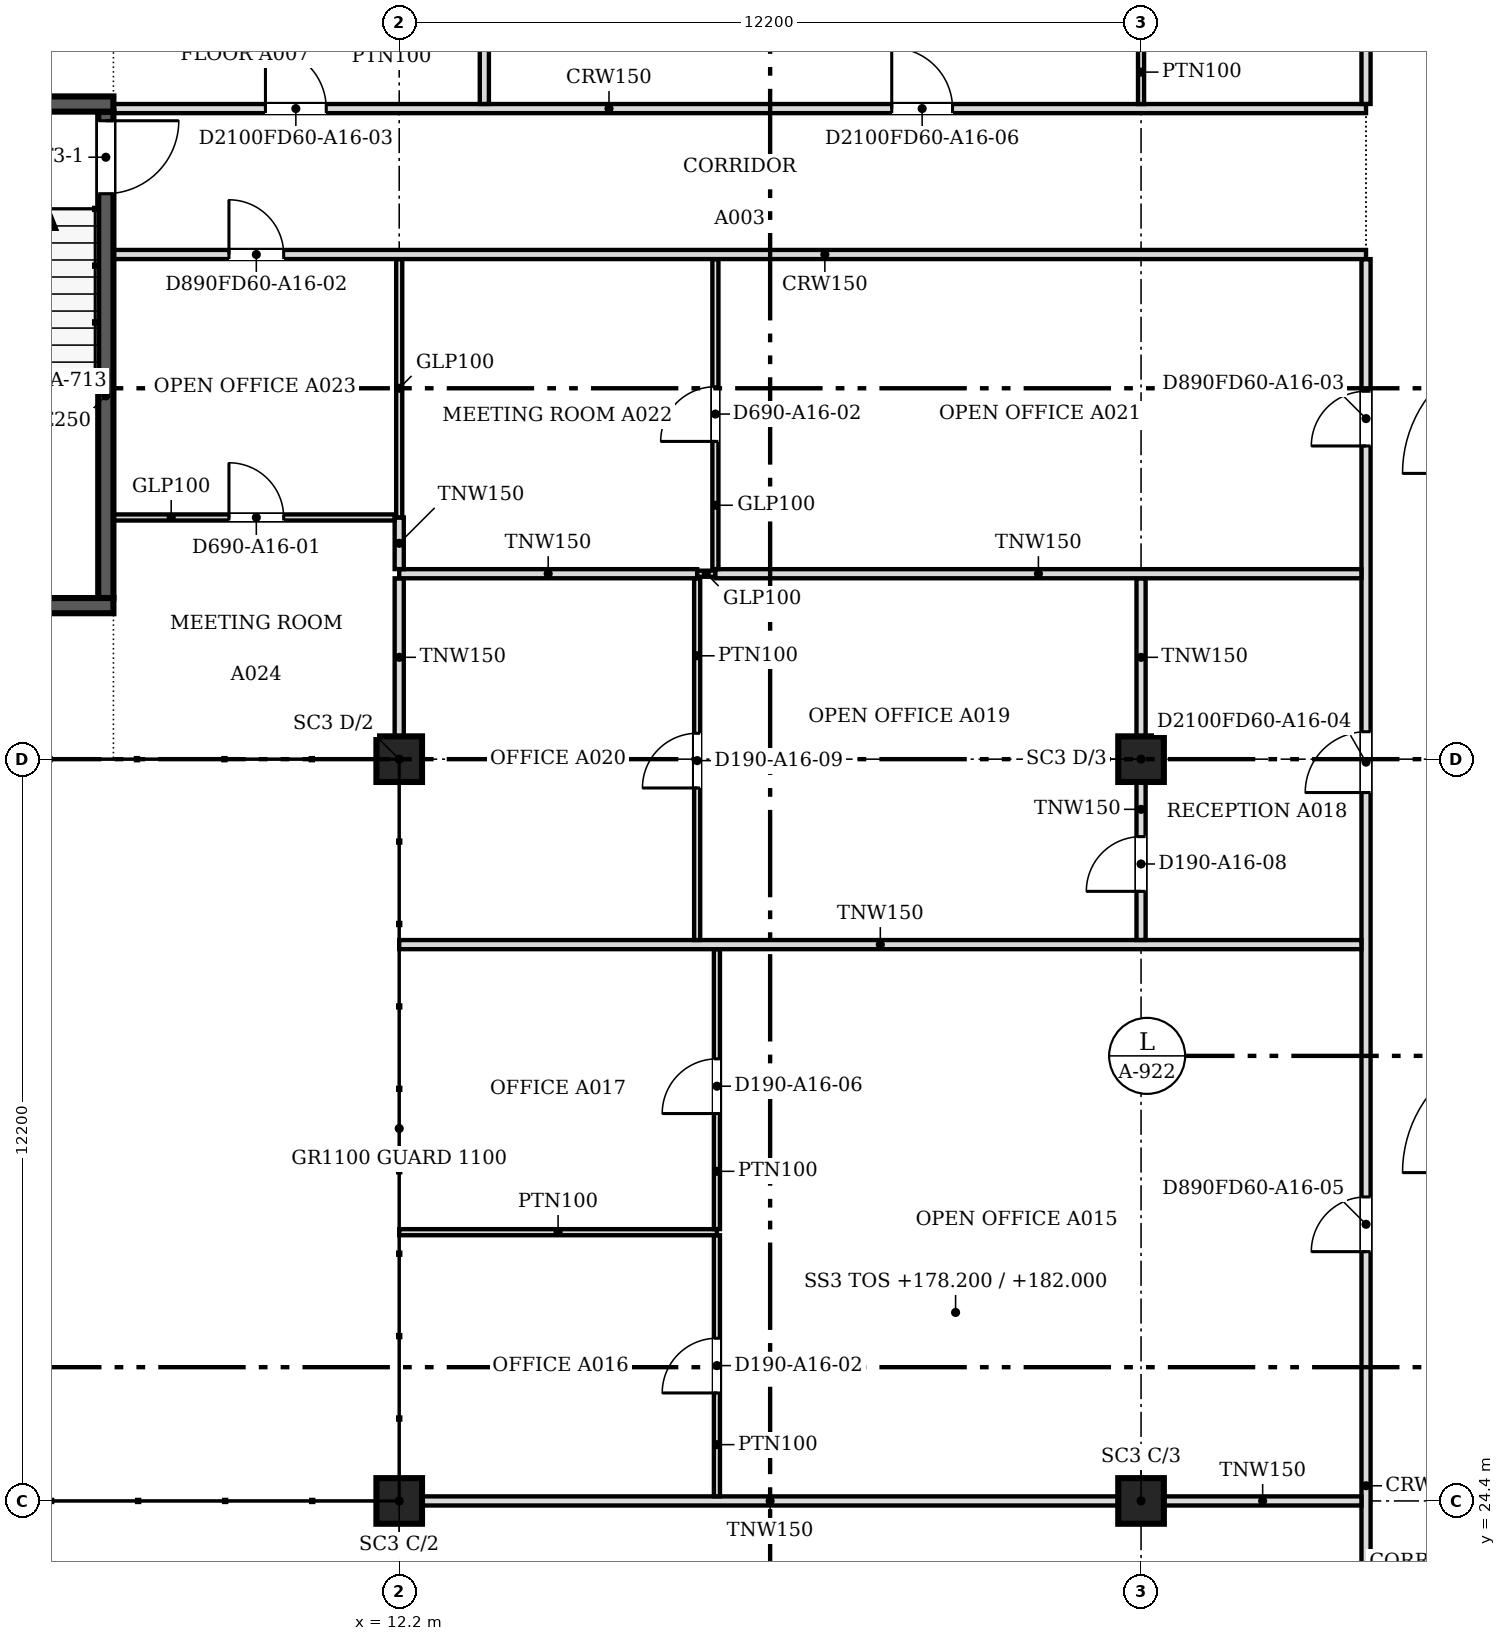
"""IFC4 building model, lengths in metres.
Left out: names, types, materials, properties, quantities, classifications, styles, units other than length and angle.
Written with IfcOpenShell. Run it as: python <this file> out.ifc"""

import sys

from ifc_helpers import new_model, si_unit, direction, frame, frame_2d, origin, origin_2d, place, context, subcontext, project, spatial, rectangle, extrude, source, transform, mapped, element, fill, save


model = new_model("IFC4")
c1 = context("Model", 3, precision=1e-05, world=origin(), true_north=direction((0.0, 1.0)))
c2 = subcontext(c1, "Body", "Model", "MODEL_VIEW")
j1 = project(units=[si_unit("LENGTHUNIT", "METRE"), si_unit("PLANEANGLEUNIT", "RADIAN")], contexts=[c1])
p1 = place(None, origin())
s1 = spatial("IfcSite", under=j1, at=p1, CompositionType="ELEMENT")
p2 = place(p1, origin())
s2 = spatial("IfcBuilding", under=s1, at=p2, CompositionType="ELEMENT")
p3 = place(p2, frame((0.0, 0.0, 178.2)))
s3 = spatial("IfcBuildingStorey", under=s2, at=p3, CompositionType="ELEMENT", Elevation=178.2)
for number, where, z_axis, x_axis in (
    (1, (12.2, 24.4, 0.0), (0.0, 0.0, 1.0), (1.0, 0.0, 0.0)),
    (2, (12.2, 36.6, 0.0), (0.0, 0.0, 1.0), (1.0, 0.0, 0.0)),
    (3, (24.4, 24.4, 0.0), (0.0, 0.0, 1.0), (1.0, 0.0, 0.0)),
    (4, (24.4, 36.6, 0.0), (0.0, 0.0, 1.0), (1.0, 0.0, 0.0)),
):
    element("IfcColumn", number, at=place(p3, frame(where, z_axis=z_axis, x_axis=x_axis)), inside=s3, PredefinedType="COLUMN", context=c2, shape_type="SweptSolid", body=[
        extrude(rectangle(XDim=0.75, YDim=0.75, at=origin_2d()), origin(), (0.0, 0.0, 1.0), 3.6),
    ])
for number, where, z_axis, x_axis in (
    (5, (7.5, 39.125, 0.0), (0.0, 0.0, 1.0), (-1.0, 0.0, 0.0)),
    (6, (3.6, 47.375, 0.0), (0.0, 0.0, 1.0), (1.0, 0.0, 0.0)),
):
    element("IfcWall", number, at=place(p3, frame(where, z_axis=z_axis, x_axis=x_axis)), inside=s3, PredefinedType="SOLIDWALL", context=c2, shape_type="SweptSolid", body=[
        extrude(rectangle(XDim=3.9, YDim=0.25, at=frame_2d((1.95, 0.0))), origin(), (0.0, 0.0, 1.0), 3.8),
    ])
p4 = place(p3, frame((7.375, 47.25, 0.0), z_axis=(0.0, 0.0, 1.0), x_axis=(0.0, -1.0, 0.0)))
e7 = element("IfcWall", 7, at=p4, inside=s3, PredefinedType="SOLIDWALL", context=c2, shape_type="SweptSolid", body=[
    extrude(rectangle(XDim=8.0, YDim=0.25, at=frame_2d((4.0, 0.0))), origin(), (0.0, 0.0, 1.0), 3.8),
])
m1 = source(origin(), c2, "Body", "SweptSolid", [
    extrude(rectangle(XDim=1.2, YDim=2.1, at=frame_2d((0.6, 1.05))), frame((0.0, 0.135, 0.0), z_axis=(0.0, -1.0, 0.0), x_axis=(1.0, 0.0, 0.0)), (0.0, 0.0, 1.0), 0.27),
])
p5 = place(p4, frame((0.15, 0.0, 0.0)))
e8 = element("IfcOpeningElement", 8, at=p5, cuts=e7, PredefinedType="OPENING", context=c2, shape_type="MappedRepresentation", body=[
    mapped(m1, transform((0.0, 0.0, 0.0), scale=1.0)),
])
p6 = place(p3, frame((28.1, 18.8, 0.0), z_axis=(0.0, 0.0, 1.0), x_axis=(0.0, 1.0, 0.0)))
e9 = element("IfcWall", 9, at=p6, inside=s3, PredefinedType="PARTITIONING", context=c2, shape_type="SweptSolid", body=[
    extrude(rectangle(XDim=26.024, YDim=0.15, at=frame_2d((13.012, 0.0))), origin(), (0.0, 0.0, 1.0), 3.067),
])
m2 = source(origin(), c2, "Body", "SweptSolid", [
    extrude(rectangle(XDim=0.9, YDim=2.1, at=frame_2d((0.45, 1.05))), frame((0.0, 0.085, 0.0), z_axis=(0.0, -1.0, 0.0), x_axis=(1.0, 0.0, 0.0)), (0.0, 0.0, 1.0), 0.17),
])
p7 = place(p6, frame((1.1, 0.0, 0.0)))
e10 = element("IfcOpeningElement", 10, at=p7, cuts=e9, PredefinedType="OPENING", context=c2, shape_type="MappedRepresentation", body=[
    mapped(m2, transform((0.0, 0.0, 0.0), scale=1.0)),
])
p8 = place(p6, frame((22.951, 0.0, 0.0)))
e11 = element("IfcOpeningElement", 11, at=p8, cuts=e9, PredefinedType="OPENING", context=c2, shape_type="MappedRepresentation", body=[
    mapped(m2, transform((0.0, 0.0, 0.0), scale=1.0)),
])
m3 = source(origin(), c2, "Body", "SweptSolid", [
    extrude(rectangle(XDim=1.0, YDim=2.1, at=frame_2d((0.5, 1.05))), frame((0.0, 0.085, 0.0), z_axis=(0.0, -1.0, 0.0), x_axis=(1.0, 0.0, 0.0)), (0.0, 0.0, 1.0), 0.17),
])
p9 = place(p6, frame((17.251, 0.0, 0.0)))
e12 = element("IfcOpeningElement", 12, at=p9, cuts=e9, PredefinedType="OPENING", context=c2, shape_type="MappedRepresentation", body=[
    mapped(m3, transform((0.0, 0.0, 0.0), scale=1.0)),
])
p10 = place(p6, frame((9.7, 0.0, 0.0)))
e13 = element("IfcOpeningElement", 13, at=p10, cuts=e9, PredefinedType="OPENING", context=c2, shape_type="MappedRepresentation", body=[
    mapped(m2, transform((0.0, 0.0, 0.0), scale=1.0)),
])
p11 = place(p3, frame((12.576, 24.4, 0.0), z_axis=(0.0, 0.0, 1.0), x_axis=(1.0, 0.0, 0.0)))
e14 = element("IfcWall", 14, at=p11, inside=s3, PredefinedType="PARTITIONING", context=c2, shape_type="SweptSolid", body=[
    extrude(rectangle(XDim=11.448, YDim=0.15, at=frame_2d((5.724, 0.0))), origin(), (0.0, 0.0, 1.0), 3.067),
])
p12 = place(p3, frame((24.776, 24.4, 0.0), z_axis=(0.0, 0.0, 1.0), x_axis=(1.0, 0.0, 0.0)))
e15 = element("IfcWall", 15, at=p12, inside=s3, PredefinedType="PARTITIONING", context=c2, shape_type="SweptSolid", body=[
    extrude(rectangle(XDim=3.248, YDim=0.15, at=frame_2d((1.624, 0.0))), origin(), (0.0, 0.0, 1.0), 3.067),
])
p13 = place(p3, frame((17.425, 24.476, 0.0), z_axis=(0.0, 0.0, 1.0), x_axis=(0.0, 1.0, 0.0)))
e16 = element("IfcWall", 16, at=p13, inside=s3, PredefinedType="PARTITIONING", context=c2, shape_type="SweptSolid", body=[
    extrude(rectangle(XDim=4.293, YDim=0.1, at=frame_2d((2.146, 0.0))), origin(), (0.0, 0.0, 1.0), 3.067),
])
m4 = source(origin(), c2, "Body", "SweptSolid", [
    extrude(rectangle(XDim=0.9, YDim=2.1, at=frame_2d((0.45, 1.05))), frame((0.0, 0.06, 0.0), z_axis=(0.0, -1.0, 0.0), x_axis=(1.0, 0.0, 0.0)), (0.0, 0.0, 1.0), 0.12),
])
p14 = place(p13, frame((1.7, 0.0, 0.0)))
e17 = element("IfcOpeningElement", 17, at=p14, cuts=e16, PredefinedType="OPENING", context=c2, shape_type="MappedRepresentation", body=[
    mapped(m4, transform((0.0, 0.0, 0.0), scale=1.0)),
])
p15 = place(p3, frame((12.2, 28.82, 0.0), z_axis=(0.0, 0.0, 1.0), x_axis=(1.0, 0.0, 0.0)))
e18 = element("IfcWall", 18, at=p15, inside=s3, PredefinedType="PARTITIONING", context=c2, shape_type="SweptSolid", body=[
    extrude(rectangle(XDim=5.225, YDim=0.1, at=frame_2d((2.613, 0.0))), origin(), (0.0, 0.0, 1.0), 3.067),
])
p16 = place(p3, frame((17.425, 28.871, 0.0), z_axis=(0.0, 0.0, 1.0), x_axis=(0.0, 1.0, 0.0)))
e19 = element("IfcWall", 19, at=p16, inside=s3, PredefinedType="PARTITIONING", context=c2, shape_type="SweptSolid", body=[
    extrude(rectangle(XDim=4.603, YDim=0.1, at=frame_2d((2.301, 0.0))), origin(), (0.0, 0.0, 1.0), 3.067),
])
p17 = place(p16, frame((1.9, 0.0, 0.0)))
e20 = element("IfcOpeningElement", 20, at=p17, cuts=e19, PredefinedType="OPENING", context=c2, shape_type="MappedRepresentation", body=[
    mapped(m4, transform((0.0, 0.0, 0.0), scale=1.0)),
])
p18 = place(p3, frame((12.2, 33.55, 0.0), z_axis=(0.0, 0.0, 1.0), x_axis=(1.0, 0.0, 0.0)))
e21 = element("IfcWall", 21, at=p18, inside=s3, PredefinedType="PARTITIONING", context=c2, shape_type="SweptSolid", body=[
    extrude(rectangle(XDim=15.824, YDim=0.15, at=frame_2d((7.912, 0.0))), origin(), (0.0, 0.0, 1.0), 3.067),
])
p19 = place(p3, frame((17.1, 33.626, 0.0), z_axis=(0.0, 0.0, 1.0), x_axis=(0.0, 1.0, 0.0)))
e22 = element("IfcWall", 22, at=p19, inside=s3, PredefinedType="PARTITIONING", context=c2, shape_type="SweptSolid", body=[
    extrude(rectangle(XDim=5.948, YDim=0.1, at=frame_2d((2.974, 0.0))), origin(), (0.0, 0.0, 1.0), 3.067),
])
p20 = place(p19, frame((2.5, 0.0, 0.0)))
e23 = element("IfcOpeningElement", 23, at=p20, cuts=e22, PredefinedType="OPENING", context=c2, shape_type="MappedRepresentation", body=[
    mapped(m4, transform((0.0, 0.0, 0.0), scale=1.0)),
])
p21 = place(p3, frame((24.4, 33.626, 0.0), z_axis=(0.0, 0.0, 1.0), x_axis=(0.0, 1.0, 0.0)))
e24 = element("IfcWall", 24, at=p21, inside=s3, PredefinedType="PARTITIONING", context=c2, shape_type="SweptSolid", body=[
    extrude(rectangle(XDim=2.598, YDim=0.15, at=frame_2d((1.299, 0.0))), origin(), (0.0, 0.0, 1.0), 3.067),
])
p22 = place(p21, frame((0.8, 0.0, 0.0)))
e25 = element("IfcOpeningElement", 25, at=p22, cuts=e24, PredefinedType="OPENING", context=c2, shape_type="MappedRepresentation", body=[
    mapped(m2, transform((0.0, 0.0, 0.0), scale=1.0)),
])
for number, where, z_axis, x_axis in (
    (26, (12.2, 36.976, 0.0), (0.0, 0.0, 1.0), (0.0, 1.0, 0.0)),
    (27, (24.4, 36.976, 0.0), (0.0, 0.0, 1.0), (0.0, 1.0, 0.0)),
):
    element("IfcWall", number, at=place(p3, frame(where, z_axis=z_axis, x_axis=x_axis)), inside=s3, PredefinedType="PARTITIONING", context=c2, shape_type="SweptSolid", body=[
        extrude(rectangle(XDim=2.598, YDim=0.15, at=frame_2d((1.299, 0.0))), origin(), (0.0, 0.0, 1.0), 3.067),
    ])
p23 = place(p3, frame((12.2, 39.65, 0.0), z_axis=(0.0, 0.0, 1.0), x_axis=(1.0, 0.0, 0.0)))
e28 = element("IfcWall", 28, at=p23, inside=s3, PredefinedType="PARTITIONING", context=c2, shape_type="SweptSolid", body=[
    extrude(rectangle(XDim=4.9, YDim=0.15, at=frame_2d((2.45, 0.0))), origin(), (0.0, 0.0, 1.0), 3.067),
])
p24 = place(p3, frame((17.101, 39.65, 0.0), z_axis=(0.0, 0.0, 1.0), x_axis=(1.0, 0.0, 0.0)))
e29 = element("IfcWall", 29, at=p24, inside=s3, PredefinedType="PARTITIONING", context=c2, shape_type="SweptSolid", body=[
    extrude(rectangle(XDim=0.298, YDim=0.1, at=frame_2d((0.149, 0.0))), origin(), (0.0, 0.0, 1.0), 3.067),
])
p25 = place(p3, frame((17.4, 39.65, 0.0), z_axis=(0.0, 0.0, 1.0), x_axis=(1.0, 0.0, 0.0)))
e30 = element("IfcWall", 30, at=p25, inside=s3, PredefinedType="PARTITIONING", context=c2, shape_type="SweptSolid", body=[
    extrude(rectangle(XDim=10.624, YDim=0.15, at=frame_2d((5.312, 0.0))), origin(), (0.0, 0.0, 1.0), 3.067),
])
p26 = place(p3, frame((12.2, 39.726, 0.0), z_axis=(0.0, 0.0, 1.0), x_axis=(0.0, 1.0, 0.0)))
e31 = element("IfcWall", 31, at=p26, inside=s3, PredefinedType="PARTITIONING", context=c2, shape_type="SweptSolid", body=[
    extrude(rectangle(XDim=0.849, YDim=0.15, at=frame_2d((0.424, 0.0))), origin(), (0.0, 0.0, 1.0), 3.067),
])
p27 = place(p3, frame((17.4, 39.726, 0.0), z_axis=(0.0, 0.0, 1.0), x_axis=(0.0, 1.0, 0.0)))
e32 = element("IfcWall", 32, at=p27, inside=s3, PredefinedType="PARTITIONING", context=c2, shape_type="SweptSolid", body=[
    extrude(rectangle(XDim=5.098, YDim=0.1, at=frame_2d((2.549, 0.0))), origin(), (0.0, 0.0, 1.0), 3.067),
])
p28 = place(p27, frame((2.1, 0.0, 0.0)))
e33 = element("IfcOpeningElement", 33, at=p28, cuts=e32, PredefinedType="OPENING", context=c2, shape_type="MappedRepresentation", body=[
    mapped(m4, transform((0.0, 0.0, 0.0), scale=1.0)),
])
p29 = place(p3, frame((12.124, 40.575, 0.0), z_axis=(0.0, 0.0, 1.0), x_axis=(-1.0, 0.0, 0.0)))
e34 = element("IfcWall", 34, at=p29, inside=s3, PredefinedType="PARTITIONING", context=c2, shape_type="SweptSolid", body=[
    extrude(rectangle(XDim=4.624, YDim=0.1, at=frame_2d((2.312, 0.0))), origin(), (0.0, 0.0, 1.0), 3.067),
])
p30 = place(p29, frame((1.824, 0.0, 0.0)))
e35 = element("IfcOpeningElement", 35, at=p30, cuts=e34, PredefinedType="OPENING", context=c2, shape_type="MappedRepresentation", body=[
    mapped(m4, transform((0.0, 0.0, 0.0), scale=1.0)),
])
p31 = place(p3, frame((12.2, 40.576, 0.0), z_axis=(0.0, 0.0, 1.0), x_axis=(0.0, 1.0, 0.0)))
e36 = element("IfcWall", 36, at=p31, inside=s3, PredefinedType="PARTITIONING", context=c2, shape_type="SweptSolid", body=[
    extrude(rectangle(XDim=4.248, YDim=0.1, at=frame_2d((2.124, 0.0))), origin(), (0.0, 0.0, 1.0), 3.067),
])
p32 = place(p3, frame((28.1, 44.9, 0.0), z_axis=(0.0, 0.0, 1.0), x_axis=(-1.0, 0.0, 0.0)))
e37 = element("IfcWall", 37, at=p32, inside=s3, PredefinedType="PARTITIONING", context=c2, shape_type="SweptSolid", body=[
    extrude(rectangle(XDim=20.6, YDim=0.15, at=frame_2d((10.3, 0.0))), origin(), (0.0, 0.0, 1.0), 3.067),
])
p33 = place(p32, frame((17.8, 0.0, 0.0)))
e38 = element("IfcOpeningElement", 38, at=p33, cuts=e37, PredefinedType="OPENING", context=c2, shape_type="MappedRepresentation", body=[
    mapped(m2, transform((0.0, 0.0, 0.0), scale=1.0)),
])
p34 = place(p3, frame((7.5, 47.3, 0.0), z_axis=(0.0, 0.0, 1.0), x_axis=(1.0, 0.0, 0.0)))
e39 = element("IfcWall", 39, at=p34, inside=s3, PredefinedType="PARTITIONING", context=c2, shape_type="SweptSolid", body=[
    extrude(rectangle(XDim=20.6, YDim=0.15, at=frame_2d((10.3, 0.0))), origin(), (0.0, 0.0, 1.0), 3.067),
])
p35 = place(p34, frame((2.5, 0.0, 0.0)))
e40 = element("IfcOpeningElement", 40, at=p35, cuts=e39, PredefinedType="OPENING", context=c2, shape_type="MappedRepresentation", body=[
    mapped(m3, transform((0.0, 0.0, 0.0), scale=1.0)),
])
p36 = place(p34, frame((12.8, 0.0, 0.0)))
e41 = element("IfcOpeningElement", 41, at=p36, cuts=e39, PredefinedType="OPENING", context=c2, shape_type="MappedRepresentation", body=[
    mapped(m3, transform((0.0, 0.0, 0.0), scale=1.0)),
])
p37 = place(p3, frame((13.6, 47.376, 0.0), z_axis=(0.0, 0.0, 1.0), x_axis=(0.0, 1.0, 0.0)))
e42 = element("IfcWall", 42, at=p37, inside=s3, PredefinedType="PARTITIONING", context=c2, shape_type="SweptSolid", body=[
    extrude(rectangle(XDim=2.898, YDim=0.15, at=frame_2d((1.449, 0.0))), origin(), (0.0, 0.0, 1.0), 3.067),
])
p38 = place(p3, frame((28.1, 47.376, 0.0), z_axis=(0.0, 0.0, 1.0), x_axis=(0.0, 1.0, 0.0)))
e43 = element("IfcWall", 43, at=p38, inside=s3, PredefinedType="PARTITIONING", context=c2, shape_type="SweptSolid", body=[
    extrude(rectangle(XDim=3.748, YDim=0.15, at=frame_2d((1.874, 0.0))), origin(), (0.0, 0.0, 1.0), 3.067),
])
p39 = place(p3, frame((24.4, 48.425, 0.0), z_axis=(0.0, 0.0, 1.0), x_axis=(0.0, -1.0, 0.0)))
e44 = element("IfcWall", 44, at=p39, inside=s3, PredefinedType="PARTITIONING", context=c2, shape_type="SweptSolid", body=[
    extrude(rectangle(XDim=1.05, YDim=0.1, at=frame_2d((0.525, 0.0))), origin(), (0.0, 0.0, 1.0), 3.067),
])
m5 = source(origin(), c2, "Body", "SweptSolid", [
    extrude(rectangle(XDim=1.2, YDim=2.1, at=frame_2d((0.6, 1.05))), frame((0.0, 0.025, 0.0), z_axis=(0.0, -1.0, 0.0), x_axis=(1.0, 0.0, 0.0)), (0.0, 0.0, 1.0), 0.05),
])
p40 = place(p5, origin())
e45 = element("IfcDoor", 45, at=p40, inside=s3, OperationType="SINGLE_SWING_LEFT", PredefinedType="DOOR", context=c2, shape_type="MappedRepresentation", body=[
    mapped(m5, transform((0.0, 0.0, 0.0), scale=1.0)),
])
fill(e8, e45)
m6 = source(origin(), c2, "Body", "SweptSolid", [
    extrude(rectangle(XDim=0.9, YDim=2.1, at=frame_2d((0.45, 1.05))), frame((0.0, 0.025, 0.0), z_axis=(0.0, -1.0, 0.0), x_axis=(1.0, 0.0, 0.0)), (0.0, 0.0, 1.0), 0.05),
])
p41 = place(p14, origin())
e46 = element("IfcDoor", 46, at=p41, inside=s3, OperationType="SINGLE_SWING_LEFT", PredefinedType="DOOR", context=c2, shape_type="MappedRepresentation", body=[
    mapped(m6, transform((0.0, 0.0, 0.0), scale=1.0)),
])
fill(e17, e46)
p42 = place(p17, origin())
e47 = element("IfcDoor", 47, at=p42, inside=s3, OperationType="SINGLE_SWING_LEFT", PredefinedType="DOOR", context=c2, shape_type="MappedRepresentation", body=[
    mapped(m6, transform((0.0, 0.0, 0.0), scale=1.0)),
])
fill(e20, e47)
p43 = place(p30, origin())
e48 = element("IfcDoor", 48, at=p43, inside=s3, OperationType="SINGLE_SWING_RIGHT", PredefinedType="DOOR", context=c2, shape_type="MappedRepresentation", body=[
    mapped(m6, transform((0.0, 0.0, 0.0), scale=1.0)),
])
fill(e35, e48)
p44 = place(p33, origin())
e49 = element("IfcDoor", 49, at=p44, inside=s3, OperationType="SINGLE_SWING_RIGHT", PredefinedType="DOOR", context=c2, shape_type="MappedRepresentation", body=[
    mapped(m6, transform((0.0, 0.0, 0.0), scale=1.0)),
])
fill(e38, e49)
p45 = place(p28, origin())
e50 = element("IfcDoor", 50, at=p45, inside=s3, OperationType="SINGLE_SWING_LEFT", PredefinedType="DOOR", context=c2, shape_type="MappedRepresentation", body=[
    mapped(m6, transform((0.0, 0.0, 0.0), scale=1.0)),
])
fill(e33, e50)
p46 = place(p8, origin())
e51 = element("IfcDoor", 51, at=p46, inside=s3, OperationType="SINGLE_SWING_LEFT", PredefinedType="DOOR", context=c2, shape_type="MappedRepresentation", body=[
    mapped(m6, transform((0.0, 0.0, 0.0), scale=1.0)),
])
fill(e11, e51)
p47 = place(p22, origin())
e52 = element("IfcDoor", 52, at=p47, inside=s3, OperationType="SINGLE_SWING_LEFT", PredefinedType="DOOR", context=c2, shape_type="MappedRepresentation", body=[
    mapped(m6, transform((0.0, 0.0, 0.0), scale=1.0)),
])
fill(e25, e52)
p48 = place(p20, origin())
e53 = element("IfcDoor", 53, at=p48, inside=s3, OperationType="SINGLE_SWING_LEFT", PredefinedType="DOOR", context=c2, shape_type="MappedRepresentation", body=[
    mapped(m6, transform((0.0, 0.0, 0.0), scale=1.0)),
])
fill(e23, e53)
m7 = source(origin(), c2, "Body", "SweptSolid", [
    extrude(rectangle(XDim=1.0, YDim=2.1, at=frame_2d((0.5, 1.05))), frame((0.0, 0.025, 0.0), z_axis=(0.0, -1.0, 0.0), x_axis=(1.0, 0.0, 0.0)), (0.0, 0.0, 1.0), 0.05),
])
p49 = place(p35, origin())
e54 = element("IfcDoor", 54, at=p49, inside=s3, OperationType="SINGLE_SWING_LEFT", PredefinedType="DOOR", context=c2, shape_type="MappedRepresentation", body=[
    mapped(m7, transform((0.0, 0.0, 0.0), scale=1.0)),
])
fill(e40, e54)
p50 = place(p9, origin())
e55 = element("IfcDoor", 55, at=p50, inside=s3, OperationType="SINGLE_SWING_LEFT", PredefinedType="DOOR", context=c2, shape_type="MappedRepresentation", body=[
    mapped(m7, transform((0.0, 0.0, 0.0), scale=1.0)),
])
fill(e12, e55)
p51 = place(p10, origin())
e56 = element("IfcDoor", 56, at=p51, inside=s3, OperationType="SINGLE_SWING_LEFT", PredefinedType="DOOR", context=c2, shape_type="MappedRepresentation", body=[
    mapped(m6, transform((0.0, 0.0, 0.0), scale=1.0)),
])
fill(e13, e56)
p52 = place(p36, origin())
e57 = element("IfcDoor", 57, at=p52, inside=s3, OperationType="SINGLE_SWING_LEFT", PredefinedType="DOOR", context=c2, shape_type="MappedRepresentation", body=[
    mapped(m7, transform((0.0, 0.0, 0.0), scale=1.0)),
])
fill(e41, e57)
save(model, sys.argv[1])
